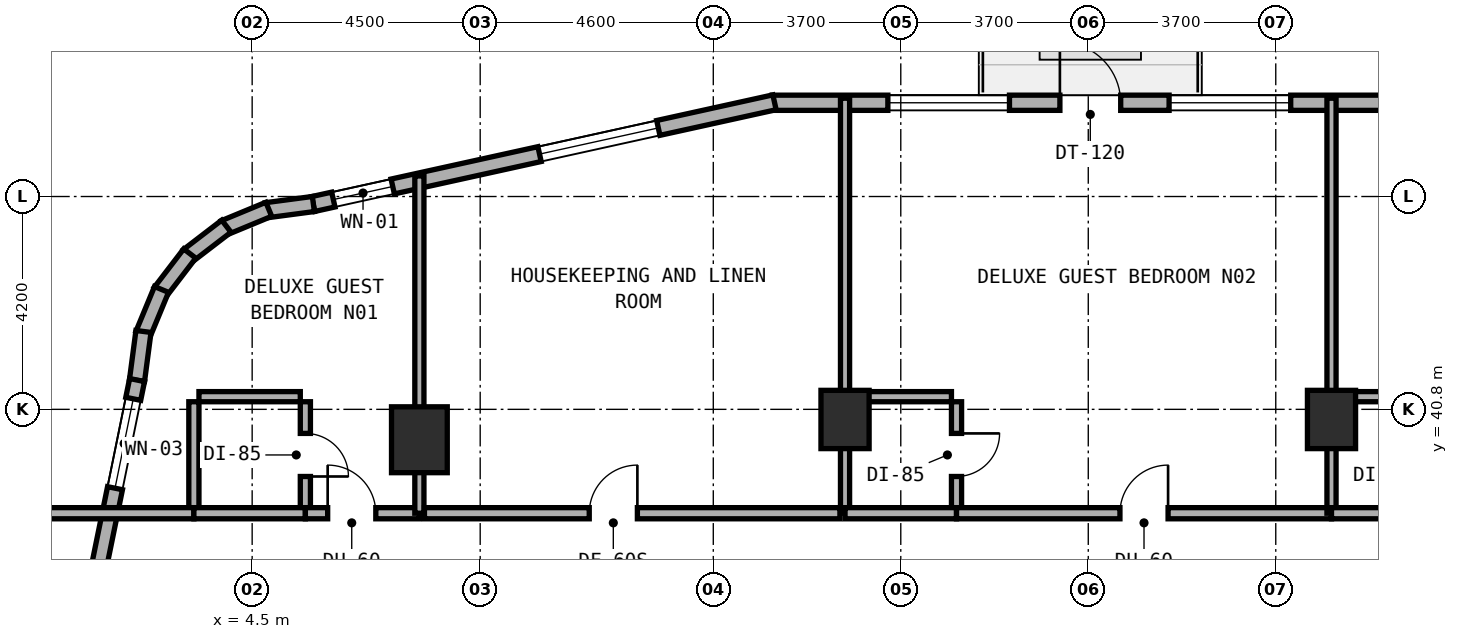
"""IFC4 building model, lengths in metres.
Left out: names, types, materials, properties, quantities, classifications, styles, units other than length and angle.
Written with IfcOpenShell. Run it as: python <this file> out.ifc"""

import sys

from ifc_helpers import new_model, si_unit, direction, frame, frame_2d, origin, origin_2d, place, context, subcontext, project, spatial, rectangle, extrude, element, fill, save


model = new_model("IFC4")
c1 = context("Model", 3, precision=1e-05, world=origin(), true_north=direction((0.0, 1.0)))
c2 = subcontext(c1, "Body", "Model", "MODEL_VIEW")
j1 = project(units=[si_unit("LENGTHUNIT", "METRE"), si_unit("PLANEANGLEUNIT", "RADIAN")], contexts=[c1])
p1 = place(None, origin())
s1 = spatial("IfcSite", under=j1, at=p1, CompositionType="ELEMENT")
p2 = place(p1, origin())
s2 = spatial("IfcBuilding", under=s1, at=p2, CompositionType="ELEMENT")
p3 = place(p2, frame((0.0, 0.0, 27.5)))
s3 = spatial("IfcBuildingStorey", under=s2, at=p3, CompositionType="ELEMENT", Elevation=27.5)
for number, where, z_axis, x_axis in (
    (1, (16.2, 40.6, 0.0), (0.0, 0.0, 1.0), (1.0, 0.0, 0.0)),
    (2, (25.8, 40.6, 0.0), (0.0, 0.0, 1.0), (1.0, 0.0, 0.0)),
):
    element("IfcColumn", number, at=place(p3, frame(where, z_axis=z_axis, x_axis=x_axis)), inside=s3, PredefinedType="COLUMN", context=c2, shape_type="SweptSolid", body=[
        extrude(rectangle(XDim=0.95, YDim=1.15, at=origin_2d()), origin(), (0.0, 0.0, 1.0), 3.5),
    ])
p4 = place(p3, frame((7.8, 40.2, 0.0), z_axis=(0.0, 0.0, 1.0), x_axis=(1.0, 0.0, 0.0)))
e3 = element("IfcColumn", 3, at=p4, inside=s3, PredefinedType="COLUMN", context=c2, shape_type="SweptSolid", body=[
    extrude(rectangle(XDim=1.1, YDim=1.3, at=origin_2d()), origin(), (0.0, 0.0, 1.0), 3.5),
])
p5 = place(p3, frame((27.353, 46.85, 0.0), z_axis=(0.0, 0.0, 1.0), x_axis=(-1.0, 0.0, 0.0)))
e4 = element("IfcWall", 4, at=p5, inside=s3, PredefinedType="STANDARD", context=c2, shape_type="SweptSolid", body=[
    extrude(rectangle(XDim=12.591, YDim=0.3, at=frame_2d((6.295, 0.0))), origin(), (0.0, 0.0, 1.0), 3.22),
])
p6 = place(p5, frame((5.713, 0.0, 0.0)))
e5 = element("IfcOpeningElement", 5, at=p6, cuts=e4, PredefinedType="OPENING", context=c2, shape_type="SweptSolid", body=[
    extrude(rectangle(XDim=1.2, YDim=2.15, at=frame_2d((0.6, 1.075))), frame((0.0, 0.16, 0.0), z_axis=(0.0, -1.0, 0.0), x_axis=(1.0, 0.0, 0.0)), (0.0, 0.0, 1.0), 0.32),
])
p7 = place(p5, frame((2.358, 0.0, 0.8)))
e6 = element("IfcOpeningElement", 6, at=p7, cuts=e4, PredefinedType="OPENING", context=c2, shape_type="SweptSolid", body=[
    extrude(rectangle(XDim=2.4, YDim=1.6, at=frame_2d((1.2, 0.8))), frame((0.0, 0.16, 0.0), z_axis=(0.0, -1.0, 0.0), x_axis=(1.0, 0.0, 0.0)), (0.0, 0.0, 1.0), 0.32),
])
p8 = place(p5, frame((7.908, 0.0, 0.8)))
e7 = element("IfcOpeningElement", 7, at=p8, cuts=e4, PredefinedType="OPENING", context=c2, shape_type="SweptSolid", body=[
    extrude(rectangle(XDim=2.4, YDim=1.6, at=frame_2d((1.2, 0.8))), frame((0.0, 0.16, 0.0), z_axis=(0.0, -1.0, 0.0), x_axis=(1.0, 0.0, 0.0)), (0.0, 0.0, 1.0), 0.32),
])
p9 = place(p3, frame((14.808, 46.859, 0.0), z_axis=(0.0, 0.0, 1.0), x_axis=(-0.976555357219, -0.21526642629, 0.0)))
e8 = element("IfcWall", 8, at=p9, inside=s3, PredefinedType="STANDARD", context=c2, shape_type="SweptSolid", body=[
    extrude(rectangle(XDim=9.323, YDim=0.3, at=frame_2d((4.661, 0.0))), origin(), (0.0, 0.0, 1.0), 3.22),
])
p10 = place(p9, frame((2.348, 0.0, 0.8)))
e9 = element("IfcOpeningElement", 9, at=p10, cuts=e8, PredefinedType="OPENING", context=c2, shape_type="SweptSolid", body=[
    extrude(rectangle(XDim=2.4, YDim=1.6, at=frame_2d((1.2, 0.8))), frame((0.0, 0.16, 0.0), z_axis=(0.0, -1.0, 0.0), x_axis=(1.0, 0.0, 0.0)), (0.0, 0.0, 1.0), 0.32),
])
p11 = place(p9, frame((7.715, 0.0, 0.85)))
e10 = element("IfcOpeningElement", 10, at=p11, cuts=e8, PredefinedType="OPENING", context=c2, shape_type="SweptSolid", body=[
    extrude(rectangle(XDim=1.2, YDim=1.5, at=frame_2d((0.6, 0.75))), frame((0.0, 0.16, 0.0), z_axis=(0.0, -1.0, 0.0), x_axis=(1.0, 0.0, 0.0)), (0.0, 0.0, 1.0), 0.32),
])
p12 = place(p3, frame((5.708, 44.852, 0.0), z_axis=(0.0, 0.0, 1.0), x_axis=(-0.991359246108, -0.131174864804, 0.0)))
e11 = element("IfcWall", 11, at=p12, inside=s3, PredefinedType="STANDARD", context=c2, shape_type="SweptSolid", body=[
    extrude(rectangle(XDim=0.938, YDim=0.3, at=frame_2d((0.469, 0.0))), origin(), (0.0, 0.0, 1.0), 3.22),
])
p13 = place(p3, frame((4.828, 44.748, 0.0), z_axis=(0.0, 0.0, 1.0), x_axis=(-0.923982547689, -0.382434636986, 0.0)))
e12 = element("IfcWall", 12, at=p13, inside=s3, PredefinedType="STANDARD", context=c2, shape_type="SweptSolid", body=[
    extrude(rectangle(XDim=0.954, YDim=0.3, at=frame_2d((0.477, 0.0))), origin(), (0.0, 0.0, 1.0), 3.22),
])
for number, where, z_axis, x_axis in (
    (13, (3.991, 44.414, 0.0), (0.0, 0.0, 1.0), (-0.794, -0.608, 0.0)),
    (14, (3.268, 43.875, 0.0), (0.0, 0.0, 1.0), (-0.608, -0.794, 0.0)),
):
    element("IfcWall", number, at=place(p3, frame(where, z_axis=z_axis, x_axis=x_axis)), inside=s3, PredefinedType="STANDARD", context=c2, shape_type="SweptSolid", body=[
        extrude(rectangle(XDim=0.955, YDim=0.3, at=frame_2d((0.478, 0.0))), origin(), (0.0, 0.0, 1.0), 3.22),
    ])
p14 = place(p3, frame((2.711, 43.166, 0.0), z_axis=(0.0, 0.0, 1.0), x_axis=(-0.382344263057, -0.924019948111, 0.0)))
e15 = element("IfcWall", 15, at=p14, inside=s3, PredefinedType="STANDARD", context=c2, shape_type="SweptSolid", body=[
    extrude(rectangle(XDim=0.955, YDim=0.3, at=frame_2d((0.477, 0.0))), origin(), (0.0, 0.0, 1.0), 3.22),
])
p15 = place(p3, frame((2.355, 42.337, 0.0), z_axis=(0.0, 0.0, 1.0), x_axis=(-0.130454512571, -0.991454295543, 0.0)))
e16 = element("IfcWall", 16, at=p15, inside=s3, PredefinedType="STANDARD", context=c2, shape_type="SweptSolid", body=[
    extrude(rectangle(XDim=0.973, YDim=0.3, at=frame_2d((0.487, 0.0))), origin(), (0.0, 0.0, 1.0), 3.22),
])
p16 = place(p3, frame((2.229, 41.378, 0.0), z_axis=(0.0, 0.0, 1.0), x_axis=(-0.199990901713, -0.979797754249, 0.0)))
e17 = element("IfcWall", 17, at=p16, inside=s3, PredefinedType="STANDARD", context=c2, shape_type="SweptSolid", body=[
    extrude(rectangle(XDim=10.065, YDim=0.3, at=frame_2d((5.033, 0.0))), origin(), (0.0, 0.0, 1.0), 3.22),
])
p17 = place(p16, frame((0.378, 0.0, 0.85)))
e18 = element("IfcOpeningElement", 18, at=p17, cuts=e17, PredefinedType="OPENING", context=c2, shape_type="SweptSolid", body=[
    extrude(rectangle(XDim=1.8, YDim=1.5, at=frame_2d((0.9, 0.75))), frame((0.0, 0.16, 0.0), z_axis=(0.0, -1.0, 0.0), x_axis=(1.0, 0.0, 0.0)), (0.0, 0.0, 1.0), 0.32),
])
p18 = place(p16, frame((5.236, 0.0, 0.8)))
e19 = element("IfcOpeningElement", 19, at=p18, cuts=e17, PredefinedType="OPENING", context=c2, shape_type="SweptSolid", body=[
    extrude(rectangle(XDim=2.4, YDim=1.6, at=frame_2d((1.2, 0.8))), frame((0.0, 0.16, 0.0), z_axis=(0.0, -1.0, 0.0), x_axis=(1.0, 0.0, 0.0)), (0.0, 0.0, 1.0), 0.32),
])
p19 = place(p3, frame((5.55, 38.85, 0.0), z_axis=(0.0, 0.0, 1.0), x_axis=(0.0, 1.0, 0.0)))
e20 = element("IfcWall", 20, at=p19, inside=s3, PredefinedType="PLUMBINGWALL", context=c2, shape_type="SweptSolid", body=[
    extrude(rectangle(XDim=2.1, YDim=0.2, at=frame_2d((1.05, 0.0))), origin(), (0.0, 0.0, 1.0), 3.22),
])
p20 = place(p19, frame((0.625, 0.0, 0.0)))
e21 = element("IfcOpeningElement", 21, at=p20, cuts=e20, PredefinedType="OPENING", context=c2, shape_type="SweptSolid", body=[
    extrude(rectangle(XDim=0.85, YDim=2.1, at=frame_2d((0.425, 1.05))), frame((0.0, 0.11, 0.0), z_axis=(0.0, -1.0, 0.0), x_axis=(1.0, 0.0, 0.0)), (0.0, 0.0, 1.0), 0.22),
])
p21 = place(p3, frame((3.45, 41.05, 0.0), z_axis=(0.0, 0.0, 1.0), x_axis=(1.0, 0.0, 0.0)))
e22 = element("IfcWall", 22, at=p21, inside=s3, PredefinedType="PLUMBINGWALL", context=c2, shape_type="SweptSolid", body=[
    extrude(rectangle(XDim=2.0, YDim=0.2, at=frame_2d((1.0, 0.0))), origin(), (0.0, 0.0, 1.0), 3.22),
])
p22 = place(p3, frame((3.35, 38.85, 0.0), z_axis=(0.0, 0.0, 1.0), x_axis=(0.0, 1.0, 0.0)))
e23 = element("IfcWall", 23, at=p22, inside=s3, PredefinedType="PLUMBINGWALL", context=c2, shape_type="SweptSolid", body=[
    extrude(rectangle(XDim=2.1, YDim=0.2, at=frame_2d((1.05, 0.0))), origin(), (0.0, 0.0, 1.0), 3.22),
])
p23 = place(p3, frame((0.24, 38.75, 0.0), z_axis=(0.0, 0.0, 1.0), x_axis=(1.0, 0.0, 0.0)))
e24 = element("IfcWall", 24, at=p23, inside=s3, PredefinedType="SOLIDWALL", context=c2, shape_type="SweptSolid", body=[
    extrude(rectangle(XDim=3.11, YDim=0.22, at=frame_2d((1.555, 0.0))), origin(), (0.0, 0.0, 1.0), 3.22),
])
p24 = place(p3, frame((3.35, 38.75, 0.0), z_axis=(0.0, 0.0, 1.0), x_axis=(1.0, 0.0, 0.0)))
e25 = element("IfcWall", 25, at=p24, inside=s3, PredefinedType="SOLIDWALL", context=c2, shape_type="SweptSolid", body=[
    extrude(rectangle(XDim=2.2, YDim=0.22, at=frame_2d((1.1, 0.0))), origin(), (0.0, 0.0, 1.0), 3.22),
])
p25 = place(p3, frame((5.55, 38.75, 0.0), z_axis=(0.0, 0.0, 1.0), x_axis=(1.0, 0.0, 0.0)))
e26 = element("IfcWall", 26, at=p25, inside=s3, PredefinedType="SOLIDWALL", context=c2, shape_type="SweptSolid", body=[
    extrude(rectangle(XDim=2.25, YDim=0.22, at=frame_2d((1.125, 0.0))), origin(), (0.0, 0.0, 1.0), 2.395),
])
p26 = place(p25, frame((0.44, 0.0, 0.0)))
e27 = element("IfcOpeningElement", 27, at=p26, cuts=e26, PredefinedType="OPENING", context=c2, shape_type="SweptSolid", body=[
    extrude(rectangle(XDim=0.95, YDim=2.1, at=frame_2d((0.475, 1.05))), frame((0.0, 0.12, 0.0), z_axis=(0.0, -1.0, 0.0), x_axis=(1.0, 0.0, 0.0)), (0.0, 0.0, 1.0), 0.24),
])
p27 = place(p3, frame((7.8, 38.75, 0.0), z_axis=(0.0, 0.0, 1.0), x_axis=(0.0, 1.0, 0.0)))
e28 = element("IfcWall", 28, at=p27, inside=s3, PredefinedType="SOLIDWALL", context=c2, shape_type="SweptSolid", body=[
    extrude(rectangle(XDim=6.656, YDim=0.18, at=frame_2d((3.328, 0.0))), origin(), (0.0, 0.0, 1.0), 2.395),
])
p28 = place(p3, frame((7.9, 38.75, 0.0), z_axis=(0.0, 0.0, 1.0), x_axis=(1.0, 0.0, 0.0)))
e29 = element("IfcWall", 29, at=p28, inside=s3, PredefinedType="SOLIDWALL", context=c2, shape_type="SweptSolid", body=[
    extrude(rectangle(XDim=8.2, YDim=0.22, at=frame_2d((4.1, 0.0))), origin(), (0.0, 0.0, 1.0), 2.745),
])
p29 = place(p28, frame((3.252, 0.0, 0.0)))
e30 = element("IfcOpeningElement", 30, at=p29, cuts=e29, PredefinedType="OPENING", context=c2, shape_type="SweptSolid", body=[
    extrude(rectangle(XDim=0.95, YDim=2.1, at=frame_2d((0.475, 1.05))), frame((0.0, 0.12, 0.0), z_axis=(0.0, -1.0, 0.0), x_axis=(1.0, 0.0, 0.0)), (0.0, 0.0, 1.0), 0.24),
])
p30 = place(p3, frame((16.2, 38.75, 0.0), z_axis=(0.0, 0.0, 1.0), x_axis=(0.0, 1.0, 0.0)))
e31 = element("IfcWall", 31, at=p30, inside=s3, PredefinedType="SOLIDWALL", context=c2, shape_type="SweptSolid", body=[
    extrude(rectangle(XDim=8.19, YDim=0.18, at=frame_2d((4.095, 0.0))), origin(), (0.0, 0.0, 1.0), 2.395),
])
p31 = place(p3, frame((18.4, 38.85, 0.0), z_axis=(0.0, 0.0, 1.0), x_axis=(0.0, 1.0, 0.0)))
e32 = element("IfcWall", 32, at=p31, inside=s3, PredefinedType="PLUMBINGWALL", context=c2, shape_type="SweptSolid", body=[
    extrude(rectangle(XDim=2.1, YDim=0.2, at=frame_2d((1.05, 0.0))), origin(), (0.0, 0.0, 1.0), 2.745),
])
p32 = place(p31, frame((0.625, 0.0, 0.0)))
e33 = element("IfcOpeningElement", 33, at=p32, cuts=e32, PredefinedType="OPENING", context=c2, shape_type="SweptSolid", body=[
    extrude(rectangle(XDim=0.85, YDim=2.1, at=frame_2d((0.425, 1.05))), frame((0.0, 0.11, 0.0), z_axis=(0.0, -1.0, 0.0), x_axis=(1.0, 0.0, 0.0)), (0.0, 0.0, 1.0), 0.22),
])
p33 = place(p3, frame((16.3, 41.05, 0.0), z_axis=(0.0, 0.0, 1.0), x_axis=(1.0, 0.0, 0.0)))
e34 = element("IfcWall", 34, at=p33, inside=s3, PredefinedType="PLUMBINGWALL", context=c2, shape_type="SweptSolid", body=[
    extrude(rectangle(XDim=2.0, YDim=0.2, at=frame_2d((1.0, 0.0))), origin(), (0.0, 0.0, 1.0), 3.22),
])
p34 = place(p3, frame((16.2, 38.75, 0.0), z_axis=(0.0, 0.0, 1.0), x_axis=(1.0, 0.0, 0.0)))
e35 = element("IfcWall", 35, at=p34, inside=s3, PredefinedType="SOLIDWALL", context=c2, shape_type="SweptSolid", body=[
    extrude(rectangle(XDim=2.2, YDim=0.22, at=frame_2d((1.1, 0.0))), origin(), (0.0, 0.0, 1.0), 2.395),
])
p35 = place(p3, frame((18.4, 38.75, 0.0), z_axis=(0.0, 0.0, 1.0), x_axis=(1.0, 0.0, 0.0)))
e36 = element("IfcWall", 36, at=p35, inside=s3, PredefinedType="SOLIDWALL", context=c2, shape_type="SweptSolid", body=[
    extrude(rectangle(XDim=7.4, YDim=0.22, at=frame_2d((3.7, 0.0))), origin(), (0.0, 0.0, 1.0), 2.395),
])
p36 = place(p35, frame((3.225, 0.0, 0.0)))
e37 = element("IfcOpeningElement", 37, at=p36, cuts=e36, PredefinedType="OPENING", context=c2, shape_type="SweptSolid", body=[
    extrude(rectangle(XDim=0.95, YDim=2.1, at=frame_2d((0.475, 1.05))), frame((0.0, 0.12, 0.0), z_axis=(0.0, -1.0, 0.0), x_axis=(1.0, 0.0, 0.0)), (0.0, 0.0, 1.0), 0.24),
])
p37 = place(p3, frame((25.8, 38.75, 0.0), z_axis=(0.0, 0.0, 1.0), x_axis=(0.0, 1.0, 0.0)))
e38 = element("IfcWall", 38, at=p37, inside=s3, PredefinedType="SOLIDWALL", context=c2, shape_type="SweptSolid", body=[
    extrude(rectangle(XDim=8.19, YDim=0.18, at=frame_2d((4.095, 0.0))), origin(), (0.0, 0.0, 1.0), 2.395),
])
p38 = place(p3, frame((25.9, 41.05, 0.0), z_axis=(0.0, 0.0, 1.0), x_axis=(1.0, 0.0, 0.0)))
e39 = element("IfcWall", 39, at=p38, inside=s3, PredefinedType="PLUMBINGWALL", context=c2, shape_type="SweptSolid", body=[
    extrude(rectangle(XDim=2.0, YDim=0.2, at=frame_2d((1.0, 0.0))), origin(), (0.0, 0.0, 1.0), 3.22),
])
p39 = place(p3, frame((25.8, 38.75, 0.0), z_axis=(0.0, 0.0, 1.0), x_axis=(1.0, 0.0, 0.0)))
e40 = element("IfcWall", 40, at=p39, inside=s3, PredefinedType="SOLIDWALL", context=c2, shape_type="SweptSolid", body=[
    extrude(rectangle(XDim=2.2, YDim=0.22, at=frame_2d((1.1, 0.0))), origin(), (0.0, 0.0, 1.0), 2.395),
])
p40 = place(p6, frame((1.2, 0.0, 0.0), z_axis=(0.0, 0.0, 1.0), x_axis=(-1.0, 0.0, 0.0)))
e41 = element("IfcDoor", 41, at=p40, inside=s3, OperationType="SINGLE_SWING_LEFT", PredefinedType="DOOR", context=c2, shape_type="SweptSolid", body=[
    extrude(rectangle(XDim=1.2, YDim=2.15, at=frame_2d((0.6, 1.075))), frame((0.0, 0.025, 0.0), z_axis=(0.0, -1.0, 0.0), x_axis=(1.0, 0.0, 0.0)), (0.0, 0.0, 1.0), 0.05),
])
fill(e5, e41)
p41 = place(p7, origin())
e42 = element("IfcWindow", 42, at=p41, inside=s3, PartitioningType="SINGLE_PANEL", PredefinedType="WINDOW", context=c2, shape_type="SweptSolid", body=[
    extrude(rectangle(XDim=2.4, YDim=1.6, at=frame_2d((1.2, 0.8))), frame((0.0, 0.03, 0.0), z_axis=(0.0, -1.0, 0.0), x_axis=(1.0, 0.0, 0.0)), (0.0, 0.0, 1.0), 0.06),
])
fill(e6, e42)
p42 = place(p8, origin())
e43 = element("IfcWindow", 43, at=p42, inside=s3, PartitioningType="SINGLE_PANEL", PredefinedType="WINDOW", context=c2, shape_type="SweptSolid", body=[
    extrude(rectangle(XDim=2.4, YDim=1.6, at=frame_2d((1.2, 0.8))), frame((0.0, 0.03, 0.0), z_axis=(0.0, -1.0, 0.0), x_axis=(1.0, 0.0, 0.0)), (0.0, 0.0, 1.0), 0.06),
])
fill(e7, e43)
p43 = place(p10, origin())
e44 = element("IfcWindow", 44, at=p43, inside=s3, PartitioningType="SINGLE_PANEL", PredefinedType="WINDOW", context=c2, shape_type="SweptSolid", body=[
    extrude(rectangle(XDim=2.4, YDim=1.6, at=frame_2d((1.2, 0.8))), frame((0.0, 0.03, 0.0), z_axis=(0.0, -1.0, 0.0), x_axis=(1.0, 0.0, 0.0)), (0.0, 0.0, 1.0), 0.06),
])
fill(e9, e44)
p44 = place(p11, origin())
e45 = element("IfcWindow", 45, at=p44, inside=s3, PartitioningType="SINGLE_PANEL", PredefinedType="WINDOW", context=c2, shape_type="SweptSolid", body=[
    extrude(rectangle(XDim=1.2, YDim=1.5, at=frame_2d((0.6, 0.75))), frame((0.0, 0.03, 0.0), z_axis=(0.0, -1.0, 0.0), x_axis=(1.0, 0.0, 0.0)), (0.0, 0.0, 1.0), 0.06),
])
fill(e10, e45)
p45 = place(p17, origin())
e46 = element("IfcWindow", 46, at=p45, inside=s3, PartitioningType="SINGLE_PANEL", PredefinedType="WINDOW", context=c2, shape_type="SweptSolid", body=[
    extrude(rectangle(XDim=1.8, YDim=1.5, at=frame_2d((0.9, 0.75))), frame((0.0, 0.03, 0.0), z_axis=(0.0, -1.0, 0.0), x_axis=(1.0, 0.0, 0.0)), (0.0, 0.0, 1.0), 0.06),
])
fill(e18, e46)
p46 = place(p20, frame((0.85, 0.0, 0.0), z_axis=(0.0, 0.0, 1.0), x_axis=(-1.0, 0.0, 0.0)))
e47 = element("IfcDoor", 47, at=p46, inside=s3, OperationType="SINGLE_SWING_RIGHT", PredefinedType="DOOR", context=c2, shape_type="SweptSolid", body=[
    extrude(rectangle(XDim=0.85, YDim=2.1, at=frame_2d((0.425, 1.05))), frame((0.0, 0.025, 0.0), z_axis=(0.0, -1.0, 0.0), x_axis=(1.0, 0.0, 0.0)), (0.0, 0.0, 1.0), 0.05),
])
fill(e21, e47)
p47 = place(p26, origin())
e48 = element("IfcDoor", 48, at=p47, inside=s3, OperationType="SINGLE_SWING_LEFT", PredefinedType="DOOR", context=c2, shape_type="SweptSolid", body=[
    extrude(rectangle(XDim=0.95, YDim=2.1, at=frame_2d((0.475, 1.05))), frame((0.0, 0.025, 0.0), z_axis=(0.0, -1.0, 0.0), x_axis=(1.0, 0.0, 0.0)), (0.0, 0.0, 1.0), 0.05),
])
fill(e27, e48)
p48 = place(p29, origin())
e49 = element("IfcDoor", 49, at=p48, inside=s3, OperationType="SINGLE_SWING_RIGHT", PredefinedType="DOOR", context=c2, shape_type="SweptSolid", body=[
    extrude(rectangle(XDim=0.95, YDim=2.1, at=frame_2d((0.475, 1.05))), frame((0.0, 0.025, 0.0), z_axis=(0.0, -1.0, 0.0), x_axis=(1.0, 0.0, 0.0)), (0.0, 0.0, 1.0), 0.05),
])
fill(e30, e49)
p49 = place(p32, frame((0.85, 0.0, 0.0), z_axis=(0.0, 0.0, 1.0), x_axis=(-1.0, 0.0, 0.0)))
e50 = element("IfcDoor", 50, at=p49, inside=s3, OperationType="SINGLE_SWING_LEFT", PredefinedType="DOOR", context=c2, shape_type="SweptSolid", body=[
    extrude(rectangle(XDim=0.85, YDim=2.1, at=frame_2d((0.425, 1.05))), frame((0.0, 0.025, 0.0), z_axis=(0.0, -1.0, 0.0), x_axis=(1.0, 0.0, 0.0)), (0.0, 0.0, 1.0), 0.05),
])
fill(e33, e50)
p50 = place(p36, origin())
e51 = element("IfcDoor", 51, at=p50, inside=s3, OperationType="SINGLE_SWING_RIGHT", PredefinedType="DOOR", context=c2, shape_type="SweptSolid", body=[
    extrude(rectangle(XDim=0.95, YDim=2.1, at=frame_2d((0.475, 1.05))), frame((0.0, 0.025, 0.0), z_axis=(0.0, -1.0, 0.0), x_axis=(1.0, 0.0, 0.0)), (0.0, 0.0, 1.0), 0.05),
])
fill(e37, e51)
save(model, sys.argv[1])
